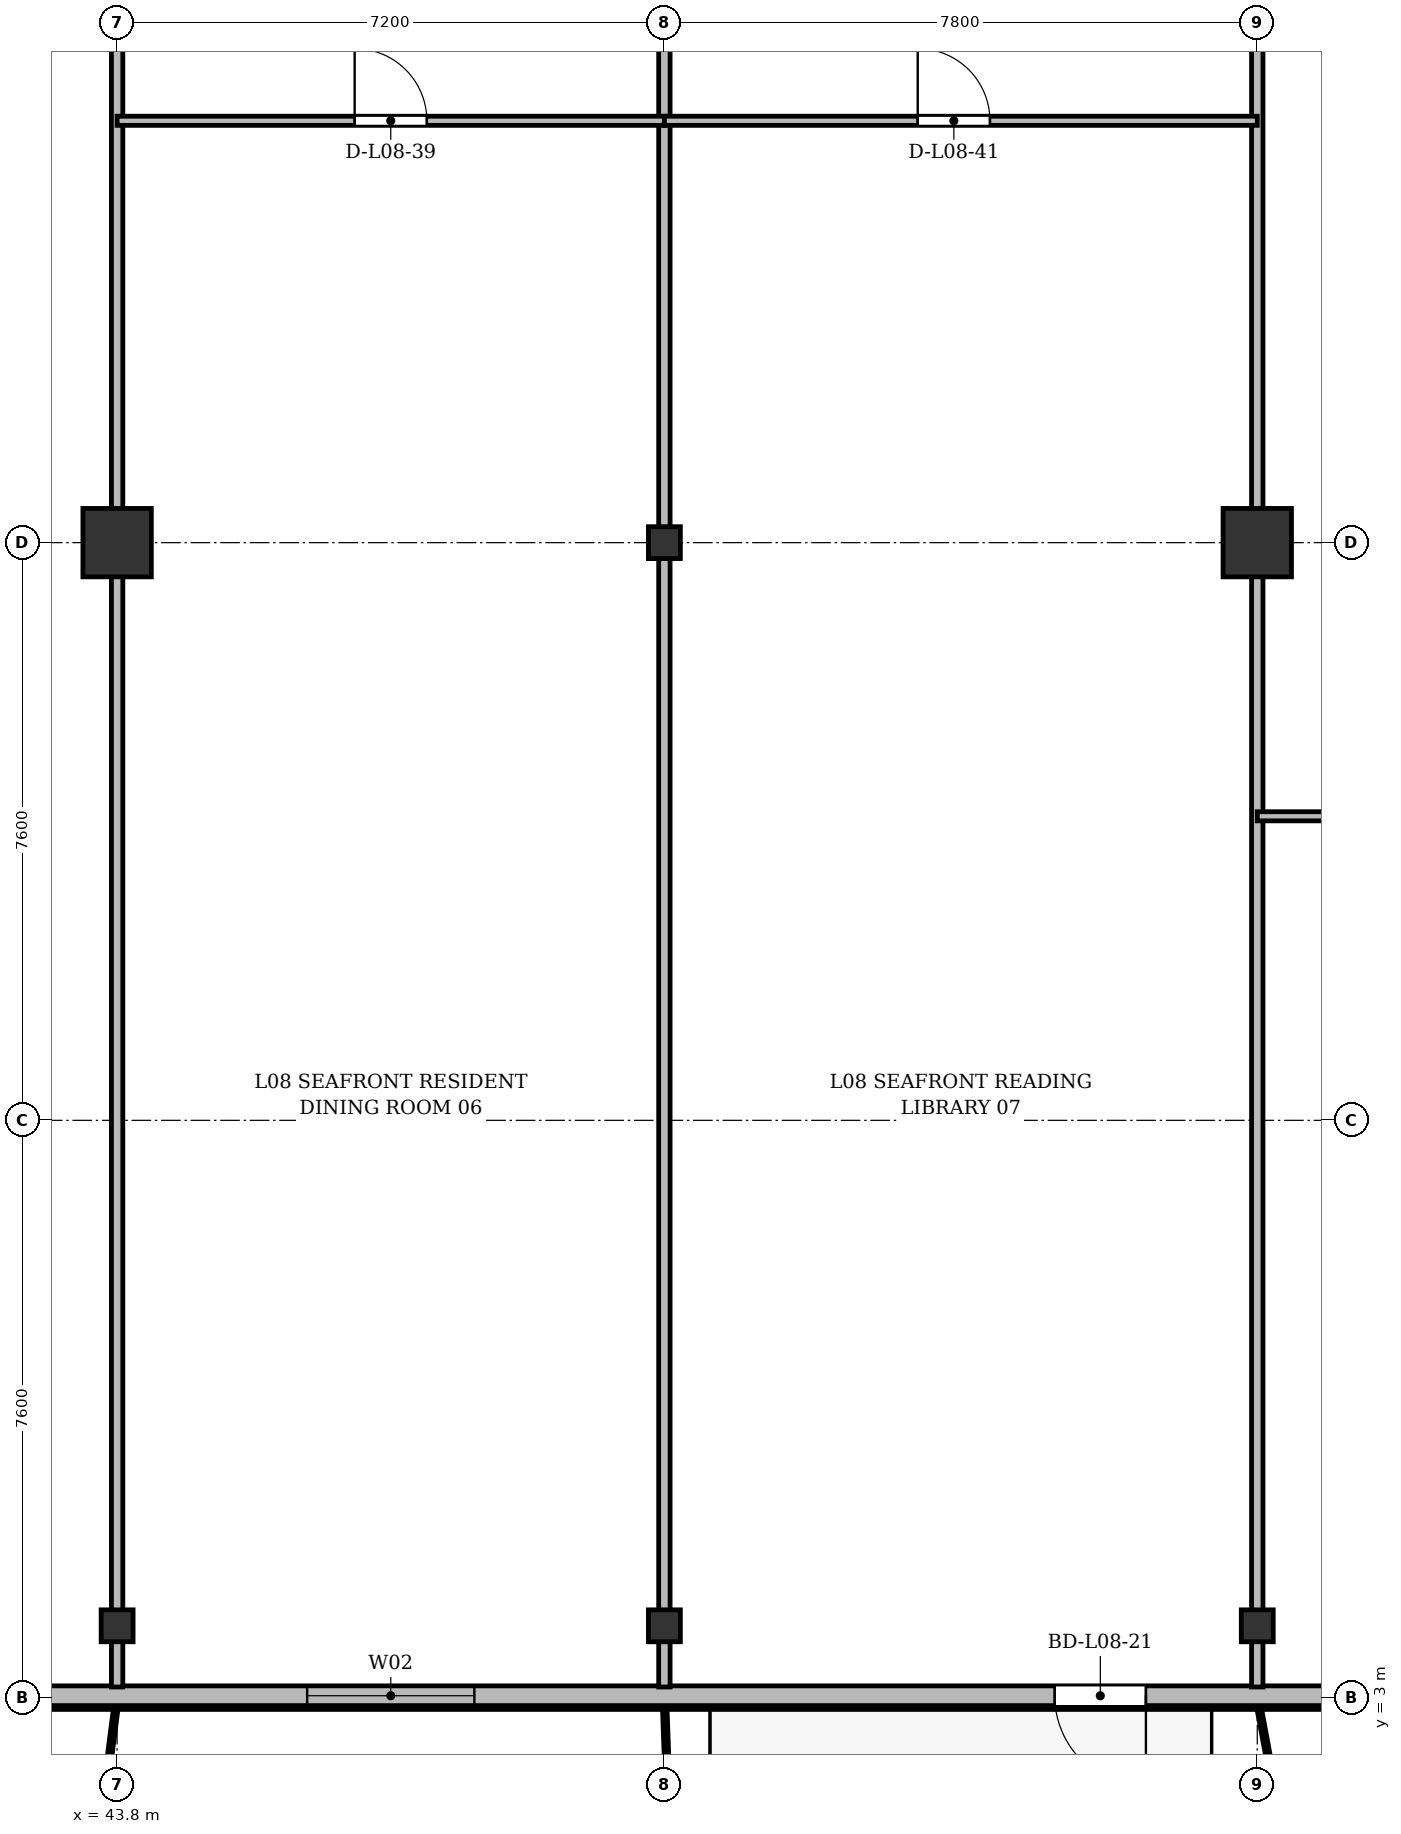
"""IFC4 building model, lengths in metres.
Left out: names, types, materials, properties, quantities, classifications, styles, units other than length and angle.
Written with IfcOpenShell. Run it as: python <this file> out.ifc"""

import sys

from ifc_helpers import new_model, si_unit, direction, frame, frame_2d, origin, origin_2d, place, context, subcontext, project, spatial, rectangle, i_section, extrude, source, transform, mapped, element, fill, save


model = new_model("IFC4")
c1 = context("Model", 3, precision=1e-05, world=origin(), true_north=direction((0.0, 1.0)))
c2 = subcontext(c1, "Body", "Model", "MODEL_VIEW")
j1 = project(units=[si_unit("LENGTHUNIT", "METRE"), si_unit("PLANEANGLEUNIT", "RADIAN")], contexts=[c1])
p1 = place(None, origin())
s1 = spatial("IfcSite", under=j1, at=p1, CompositionType="ELEMENT")
p2 = place(p1, origin())
s2 = spatial("IfcBuilding", under=s1, at=p2, CompositionType="ELEMENT")
p3 = place(p2, frame((0.0, 0.0, 34.3)))
s3 = spatial("IfcBuildingStorey", under=s2, at=p3, CompositionType="ELEMENT", Elevation=34.3)
m1 = source(origin(), c2, "Body", "SweptSolid", [
    extrude(i_section(OverallWidth=0.42, OverallDepth=0.42, WebThickness=0.026, FlangeThickness=0.04, at=origin_2d()), origin(), (0.0, 0.0, 1.0), 3.6),
])
p4 = place(p3, frame((43.8, 3.95, 0.0), z_axis=(0.0, 0.0, 1.0), x_axis=(1.0, 0.0, 0.0)))
e1 = element("IfcColumn", 1, at=p4, inside=s3, PredefinedType="COLUMN", context=c2, shape_type="MappedRepresentation", body=[
    mapped(m1, transform((0.0, 0.0, 0.0), x_axis=(1.0, 0.0, 0.0), y_axis=(0.0, 1.0, 0.0), z_axis=(0.0, 0.0, 1.0), scale=1.0)),
])
m2 = source(origin(), c2, "Body", "SweptSolid", [
    extrude(rectangle(XDim=0.9, YDim=0.9, at=origin_2d()), origin(), (0.0, 0.0, 1.0), 3.6),
])
p5 = place(p3, frame((43.8, 18.2, 0.0), z_axis=(0.0, 0.0, 1.0), x_axis=(1.0, 0.0, 0.0)))
e2 = element("IfcColumn", 2, at=p5, inside=s3, PredefinedType="COLUMN", context=c2, shape_type="MappedRepresentation", body=[
    mapped(m2, transform((0.0, 0.0, 0.0), x_axis=(1.0, 0.0, 0.0), y_axis=(0.0, 1.0, 0.0), z_axis=(0.0, 0.0, 1.0), scale=1.0)),
])
for number, where, z_axis, x_axis in (
    (3, (51.0, 3.95, 0.0), (0.0, 0.0, 1.0), (1.0, 0.0, 0.0)),
    (4, (51.0, 18.2, 0.0), (0.0, 0.0, 1.0), (1.0, 0.0, 0.0)),
    (5, (58.8, 3.95, 0.0), (0.0, 0.0, 1.0), (1.0, 0.0, 0.0)),
):
    element("IfcColumn", number, at=place(p3, frame(where, z_axis=z_axis, x_axis=x_axis)), inside=s3, PredefinedType="COLUMN", context=c2, shape_type="MappedRepresentation", body=[
        mapped(m1, transform((0.0, 0.0, 0.0), x_axis=(1.0, 0.0, 0.0), y_axis=(0.0, 1.0, 0.0), z_axis=(0.0, 0.0, 1.0), scale=1.0)),
    ])
p6 = place(p3, frame((58.8, 18.2, 0.0), z_axis=(0.0, 0.0, 1.0), x_axis=(1.0, 0.0, 0.0)))
e6 = element("IfcColumn", 6, at=p6, inside=s3, PredefinedType="COLUMN", context=c2, shape_type="MappedRepresentation", body=[
    mapped(m2, transform((0.0, 0.0, 0.0), x_axis=(1.0, 0.0, 0.0), y_axis=(0.0, 1.0, 0.0), z_axis=(0.0, 0.0, 1.0), scale=1.0)),
])
p7 = place(p3, frame((66.9, 3.03, 0.0), z_axis=(0.0, 0.0, 1.0), x_axis=(-1.0, 0.0, 0.0)))
e7 = element("IfcWall", 7, at=p7, inside=s3, PredefinedType="SOLIDWALL", context=c2, shape_type="SweptSolid", body=[
    extrude(rectangle(XDim=59.4, YDim=0.26, at=frame_2d((29.7, 0.0))), origin(), (0.0, 0.0, 1.0), 3.34),
])
p8 = place(p7, frame((3.875, 0.0, 0.9)))
e8 = element("IfcOpeningElement", 8, at=p8, cuts=e7, PredefinedType="OPENING", context=c2, shape_type="SweptSolid", body=[
    extrude(rectangle(XDim=1.65, YDim=1.85, at=frame_2d((0.825, 0.925))), frame((0.0, 0.14, 0.0), z_axis=(0.0, -1.0, 0.0), x_axis=(1.0, 0.0, 0.0)), (0.0, 0.0, 1.0), 0.28),
])
p9 = place(p7, frame((9.565, 0.0, 0.0)))
e9 = element("IfcOpeningElement", 9, at=p9, cuts=e7, PredefinedType="OPENING", context=c2, shape_type="SweptSolid", body=[
    extrude(rectangle(XDim=1.2, YDim=2.2, at=frame_2d((0.6, 1.1))), frame((0.0, 0.14, 0.0), z_axis=(0.0, -1.0, 0.0), x_axis=(1.0, 0.0, 0.0)), (0.0, 0.0, 1.0), 0.28),
])
p10 = place(p7, frame((18.4, 0.0, 0.9)))
e10 = element("IfcOpeningElement", 10, at=p10, cuts=e7, PredefinedType="OPENING", context=c2, shape_type="SweptSolid", body=[
    extrude(rectangle(XDim=2.2, YDim=1.8, at=frame_2d((1.1, 0.9))), frame((0.0, 0.14, 0.0), z_axis=(0.0, -1.0, 0.0), x_axis=(1.0, 0.0, 0.0)), (0.0, 0.0, 1.0), 0.28),
])
p11 = place(p7, frame((28.95, 0.0, 0.9)))
e11 = element("IfcOpeningElement", 11, at=p11, cuts=e7, PredefinedType="OPENING", context=c2, shape_type="SweptSolid", body=[
    extrude(rectangle(XDim=1.5, YDim=1.75, at=frame_2d((0.75, 0.875))), frame((0.0, 0.14, 0.0), z_axis=(0.0, -1.0, 0.0), x_axis=(1.0, 0.0, 0.0)), (0.0, 0.0, 1.0), 0.28),
])
p12 = place(p7, frame((40.301, 0.0, 0.0)))
e12 = element("IfcOpeningElement", 12, at=p12, cuts=e7, PredefinedType="OPENING", context=c2, shape_type="SweptSolid", body=[
    extrude(rectangle(XDim=1.2, YDim=2.2, at=frame_2d((0.6, 1.1))), frame((0.0, 0.14, 0.0), z_axis=(0.0, -1.0, 0.0), x_axis=(1.0, 0.0, 0.0)), (0.0, 0.0, 1.0), 0.28),
])
p13 = place(p7, frame((46.575, 0.0, 0.9)))
e13 = element("IfcOpeningElement", 13, at=p13, cuts=e7, PredefinedType="OPENING", context=c2, shape_type="SweptSolid", body=[
    extrude(rectangle(XDim=1.65, YDim=1.85, at=frame_2d((0.825, 0.925))), frame((0.0, 0.14, 0.0), z_axis=(0.0, -1.0, 0.0), x_axis=(1.0, 0.0, 0.0)), (0.0, 0.0, 1.0), 0.28),
])
p14 = place(p7, frame((55.817, 0.0, 0.0)))
e14 = element("IfcOpeningElement", 14, at=p14, cuts=e7, PredefinedType="OPENING", context=c2, shape_type="SweptSolid", body=[
    extrude(rectangle(XDim=1.2, YDim=2.2, at=frame_2d((0.6, 1.1))), frame((0.0, 0.14, 0.0), z_axis=(0.0, -1.0, 0.0), x_axis=(1.0, 0.0, 0.0)), (0.0, 0.0, 1.0), 0.28),
])
for number, where, z_axis, x_axis in (
    (15, (43.8, 3.145, 0.0), (0.0, 0.0, 1.0), (0.0, 1.0, 0.0)),
    (16, (51.0, 3.145, 0.0), (0.0, 0.0, 1.0), (0.0, 1.0, 0.0)),
    (17, (58.8, 3.145, 0.0), (0.0, 0.0, 1.0), (0.0, 1.0, 0.0)),
):
    element("IfcWall", number, at=place(p3, frame(where, z_axis=z_axis, x_axis=x_axis)), inside=s3, PredefinedType="PARTITIONING", context=c2, shape_type="SweptSolid", body=[
        extrude(rectangle(XDim=24.455, YDim=0.15, at=frame_2d((12.228, 0.0))), origin(), (0.0, 0.0, 1.0), 2.752),
    ])
p15 = place(p3, frame((43.8, 23.75, 0.0), z_axis=(0.0, 0.0, 1.0), x_axis=(1.0, 0.0, 0.0)))
e18 = element("IfcWall", 18, at=p15, inside=s3, PredefinedType="PARTITIONING", context=c2, shape_type="SweptSolid", body=[
    extrude(rectangle(XDim=7.2, YDim=0.12, at=frame_2d((3.6, 0.0))), origin(), (0.0, 0.0, 1.0), 2.752),
])
p16 = place(p15, frame((3.125, 0.0, 0.0)))
e19 = element("IfcOpeningElement", 19, at=p16, cuts=e18, PredefinedType="OPENING", context=c2, shape_type="SweptSolid", body=[
    extrude(rectangle(XDim=0.95, YDim=2.15, at=frame_2d((0.475, 1.075))), frame((0.0, 0.07, 0.0), z_axis=(0.0, -1.0, 0.0), x_axis=(1.0, 0.0, 0.0)), (0.0, 0.0, 1.0), 0.14),
])
p17 = place(p3, frame((51.0, 23.75, 0.0), z_axis=(0.0, 0.0, 1.0), x_axis=(1.0, 0.0, 0.0)))
e20 = element("IfcWall", 20, at=p17, inside=s3, PredefinedType="PARTITIONING", context=c2, shape_type="SweptSolid", body=[
    extrude(rectangle(XDim=7.8, YDim=0.12, at=frame_2d((3.9, 0.0))), origin(), (0.0, 0.0, 1.0), 2.752),
])
p18 = place(p17, frame((3.333, 0.0, 0.0)))
e21 = element("IfcOpeningElement", 21, at=p18, cuts=e20, PredefinedType="OPENING", context=c2, shape_type="SweptSolid", body=[
    extrude(rectangle(XDim=0.95, YDim=2.15, at=frame_2d((0.475, 1.075))), frame((0.0, 0.07, 0.0), z_axis=(0.0, -1.0, 0.0), x_axis=(1.0, 0.0, 0.0)), (0.0, 0.0, 1.0), 0.14),
])
p19 = place(p3, frame((58.8, 14.6, 0.0), z_axis=(0.0, 0.0, 1.0), x_axis=(1.0, 0.0, 0.0)))
e22 = element("IfcWall", 22, at=p19, inside=s3, PredefinedType="PARTITIONING", context=c2, shape_type="SweptSolid", body=[
    extrude(rectangle(XDim=6.8, YDim=0.12, at=frame_2d((3.4, 0.0))), origin(), (0.0, 0.0, 1.0), 2.752),
])
p20 = place(p19, frame((2.925, 0.0, 0.0)))
e23 = element("IfcOpeningElement", 23, at=p20, cuts=e22, PredefinedType="OPENING", context=c2, shape_type="SweptSolid", body=[
    extrude(rectangle(XDim=0.95, YDim=2.15, at=frame_2d((0.475, 1.075))), frame((0.0, 0.07, 0.0), z_axis=(0.0, -1.0, 0.0), x_axis=(1.0, 0.0, 0.0)), (0.0, 0.0, 1.0), 0.14),
])
m3 = source(origin(), c2, "Body", "SweptSolid", [
    extrude(rectangle(XDim=1.2, YDim=2.2, at=frame_2d((0.6, 1.1))), frame((0.0, 0.025, 0.0), z_axis=(0.0, -1.0, 0.0), x_axis=(1.0, 0.0, 0.0)), (0.0, 0.0, 1.0), 0.05),
])
p21 = place(p9, origin())
e24 = element("IfcDoor", 24, at=p21, inside=s3, OperationType="SINGLE_SWING_LEFT", PredefinedType="DOOR", context=c2, shape_type="MappedRepresentation", body=[
    mapped(m3, transform((0.0, 0.0, 0.0), x_axis=(1.0, 0.0, 0.0), y_axis=(0.0, 1.0, 0.0), z_axis=(0.0, 0.0, 1.0), scale=1.0)),
])
fill(e9, e24)
m4 = source(origin(), c2, "Body", "SweptSolid", [
    extrude(rectangle(XDim=2.2, YDim=1.8, at=frame_2d((1.1, 0.9))), frame((0.0, 0.03, 0.0), z_axis=(0.0, -1.0, 0.0), x_axis=(1.0, 0.0, 0.0)), (0.0, 0.0, 1.0), 0.06),
])
p22 = place(p10, origin())
e25 = element("IfcWindow", 25, at=p22, inside=s3, PartitioningType="SINGLE_PANEL", PredefinedType="WINDOW", context=c2, shape_type="MappedRepresentation", body=[
    mapped(m4, transform((0.0, 0.0, 0.0), x_axis=(1.0, 0.0, 0.0), y_axis=(0.0, 1.0, 0.0), z_axis=(0.0, 0.0, 1.0), scale=1.0)),
])
fill(e10, e25)
m5 = source(origin(), c2, "Body", "SweptSolid", [
    extrude(rectangle(XDim=0.95, YDim=2.15, at=frame_2d((0.475, 1.075))), frame((0.0, 0.025, 0.0), z_axis=(0.0, -1.0, 0.0), x_axis=(1.0, 0.0, 0.0)), (0.0, 0.0, 1.0), 0.05),
])
p23 = place(p16, origin())
e26 = element("IfcDoor", 26, at=p23, inside=s3, OperationType="SINGLE_SWING_LEFT", PredefinedType="DOOR", context=c2, shape_type="MappedRepresentation", body=[
    mapped(m5, transform((0.0, 0.0, 0.0), x_axis=(1.0, 0.0, 0.0), y_axis=(0.0, 1.0, 0.0), z_axis=(0.0, 0.0, 1.0), scale=1.0)),
])
fill(e19, e26)
p24 = place(p18, origin())
e27 = element("IfcDoor", 27, at=p24, inside=s3, OperationType="SINGLE_SWING_LEFT", PredefinedType="DOOR", context=c2, shape_type="MappedRepresentation", body=[
    mapped(m5, transform((0.0, 0.0, 0.0), x_axis=(1.0, 0.0, 0.0), y_axis=(0.0, 1.0, 0.0), z_axis=(0.0, 0.0, 1.0), scale=1.0)),
])
fill(e21, e27)
save(model, sys.argv[1])
